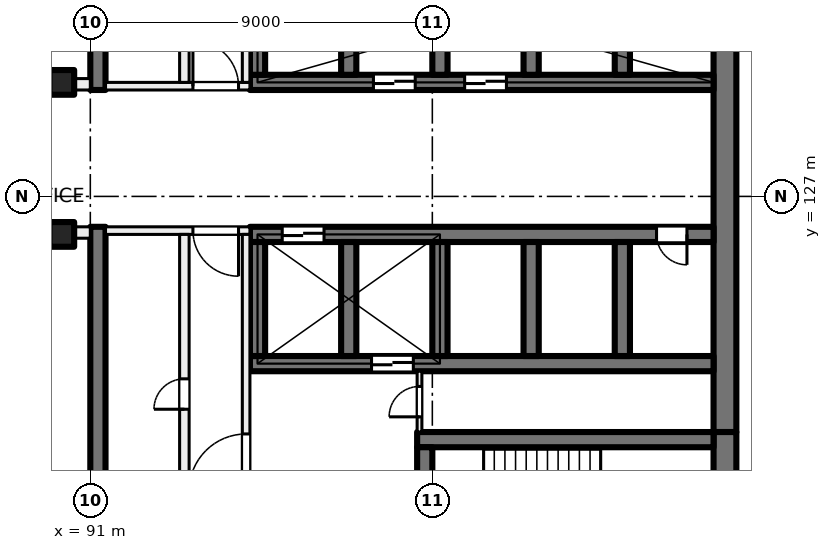
"""IFC4 building model, lengths in metres.
Left out: names, types, materials, properties, quantities, classifications, styles, units other than length and angle.
Written with IfcOpenShell. Run it as: python <this file> out.ifc"""

import sys

from ifc_helpers import new_model, si_unit, direction, frame, frame_2d, origin, origin_2d, place, context, subcontext, project, spatial, rectangle, extrude, element, fill, save


model = new_model("IFC4")
c1 = context("Model", 3, precision=1e-05, world=origin(), true_north=direction((0.0, 1.0)))
c2 = subcontext(c1, "Body", "Model", "MODEL_VIEW")
j1 = project(units=[si_unit("LENGTHUNIT", "METRE"), si_unit("PLANEANGLEUNIT", "RADIAN")], contexts=[c1])
p1 = place(None, origin())
s1 = spatial("IfcSite", under=j1, at=p1, CompositionType="ELEMENT")
p2 = place(p1, origin())
s2 = spatial("IfcBuilding", under=s1, at=p2, CompositionType="ELEMENT")
p3 = place(p2, frame((0.0, 0.0, 97.0)))
s3 = spatial("IfcBuildingStorey", under=s2, at=p3, CompositionType="ELEMENT", Elevation=97.0)
for number, where, z_axis, x_axis in (
    (1, (90.25, 130.0, 0.0), (0.0, 0.0, 1.0), (1.0, 0.0, 0.0)),
    (2, (90.25, 126.0, 0.0), (0.0, 0.0, 1.0), (1.0, 0.0, 0.0)),
):
    element("IfcColumn", number, at=place(p3, frame(where, z_axis=z_axis, x_axis=x_axis)), inside=s3, PredefinedType="COLUMN", context=c2, shape_type="SweptSolid", body=[
        extrude(rectangle(XDim=0.65, YDim=0.65, at=origin_2d()), origin(), (0.0, 0.0, 1.0), 4.0),
    ])
p4 = place(p3, frame((107.7, 135.2, 0.0), z_axis=(0.0, 0.0, 1.0), x_axis=(0.0, -1.0, 0.0)))
e3 = element("IfcWall", 3, at=p4, inside=s3, PredefinedType="SHEAR", context=c2, shape_type="SweptSolid", body=[
    extrude(rectangle(XDim=14.4, YDim=0.6, at=frame_2d((7.2, 0.0))), origin(), (0.0, 0.0, 1.0), 4.0),
])
p5 = place(p3, frame((107.7, 120.8, 0.0), z_axis=(0.0, 0.0, 1.0), x_axis=(0.0, -1.0, 0.0)))
e4 = element("IfcWall", 4, at=p5, inside=s3, PredefinedType="SHEAR", context=c2, shape_type="SweptSolid", body=[
    extrude(rectangle(XDim=3.8, YDim=0.6, at=frame_2d((1.9, 0.0))), origin(), (0.0, 0.0, 1.0), 4.0),
])
p6 = place(p3, frame((107.4, 120.6, 0.0), z_axis=(0.0, 0.0, 1.0), x_axis=(-1.0, 0.0, 0.0)))
e5 = element("IfcWall", 5, at=p6, inside=s3, PredefinedType="SHEAR", context=c2, shape_type="SweptSolid", body=[
    extrude(rectangle(XDim=7.8, YDim=0.4, at=frame_2d((3.9, 0.0))), origin(), (0.0, 0.0, 1.0), 4.0),
])
p7 = place(p3, frame((99.8, 120.4, 0.0), z_axis=(0.0, 0.0, 1.0), x_axis=(0.0, -1.0, 0.0)))
e6 = element("IfcWall", 6, at=p7, inside=s3, PredefinedType="SHEAR", context=c2, shape_type="SweptSolid", body=[
    extrude(rectangle(XDim=2.8, YDim=0.4, at=frame_2d((1.4, 0.0))), origin(), (0.0, 0.0, 1.0), 4.0),
])
p8 = place(p7, frame((0.9, 0.0, 0.0)))
e7 = element("IfcOpeningElement", 7, at=p8, cuts=e6, PredefinedType="OPENING", context=c2, shape_type="SweptSolid", body=[
    extrude(rectangle(XDim=1.0, YDim=2.1, at=frame_2d((0.5, 1.05))), frame((0.0, 0.21, 0.0), z_axis=(0.0, -1.0, 0.0), x_axis=(1.0, 0.0, 0.0)), (0.0, 0.0, 1.0), 0.42),
])
p9 = place(p3, frame((107.4, 130.0, 0.0), z_axis=(0.0, 0.0, 1.0), x_axis=(-1.0, 0.0, 0.0)))
e8 = element("IfcWall", 8, at=p9, inside=s3, PredefinedType="SHEAR", context=c2, shape_type="SweptSolid", body=[
    extrude(rectangle(XDim=12.2, YDim=0.4, at=frame_2d((6.1, 0.0))), origin(), (0.0, 0.0, 1.0), 4.0),
])
p10 = place(p9, frame((5.45, 0.0, 0.0)))
e9 = element("IfcOpeningElement", 9, at=p10, cuts=e8, PredefinedType="OPENING", context=c2, shape_type="SweptSolid", body=[
    extrude(rectangle(XDim=1.1, YDim=2.1, at=frame_2d((0.55, 1.05))), frame((0.0, 0.21, 0.0), z_axis=(0.0, -1.0, 0.0), x_axis=(1.0, 0.0, 0.0)), (0.0, 0.0, 1.0), 0.42),
])
p11 = place(p9, frame((7.85, 0.0, 0.0)))
e10 = element("IfcOpeningElement", 10, at=p11, cuts=e8, PredefinedType="OPENING", context=c2, shape_type="SweptSolid", body=[
    extrude(rectangle(XDim=1.1, YDim=2.1, at=frame_2d((0.55, 1.05))), frame((0.0, 0.21, 0.0), z_axis=(0.0, -1.0, 0.0), x_axis=(1.0, 0.0, 0.0)), (0.0, 0.0, 1.0), 0.42),
])
for number, where, z_axis, x_axis in (
    (11, (105.0, 133.2, 0.0), (0.0, 0.0, 1.0), (0.0, -1.0, 0.0)),
    (12, (102.6, 133.2, 0.0), (0.0, 0.0, 1.0), (0.0, -1.0, 0.0)),
    (13, (100.2, 133.2, 0.0), (0.0, 0.0, 1.0), (0.0, -1.0, 0.0)),
    (14, (97.8, 133.2, 0.0), (0.0, 0.0, 1.0), (0.0, -1.0, 0.0)),
    (15, (95.4, 133.2, 0.0), (0.0, 0.0, 1.0), (0.0, -1.0, 0.0)),
):
    element("IfcWall", number, at=place(p3, frame(where, z_axis=z_axis, x_axis=x_axis)), inside=s3, PredefinedType="SHEAR", context=c2, shape_type="SweptSolid", body=[
        extrude(rectangle(XDim=3.0, YDim=0.4, at=frame_2d((1.5, 0.0))), origin(), (0.0, 0.0, 1.0), 4.0),
    ])
p12 = place(p3, frame((107.4, 126.0, 0.0), z_axis=(0.0, 0.0, 1.0), x_axis=(-1.0, 0.0, 0.0)))
e16 = element("IfcWall", 16, at=p12, inside=s3, PredefinedType="SHEAR", context=c2, shape_type="SweptSolid", body=[
    extrude(rectangle(XDim=12.2, YDim=0.4, at=frame_2d((6.1, 0.0))), origin(), (0.0, 0.0, 1.0), 4.0),
])
p13 = place(p12, frame((10.25, 0.0, 0.0)))
e17 = element("IfcOpeningElement", 17, at=p13, cuts=e16, PredefinedType="OPENING", context=c2, shape_type="SweptSolid", body=[
    extrude(rectangle(XDim=1.1, YDim=2.1, at=frame_2d((0.55, 1.05))), frame((0.0, 0.21, 0.0), z_axis=(0.0, -1.0, 0.0), x_axis=(1.0, 0.0, 0.0)), (0.0, 0.0, 1.0), 0.42),
])
p14 = place(p12, frame((0.7, 0.0, 0.0)))
e18 = element("IfcOpeningElement", 18, at=p14, cuts=e16, PredefinedType="OPENING", context=c2, shape_type="SweptSolid", body=[
    extrude(rectangle(XDim=0.8, YDim=2.1, at=frame_2d((0.4, 1.05))), frame((0.0, 0.21, 0.0), z_axis=(0.0, -1.0, 0.0), x_axis=(1.0, 0.0, 0.0)), (0.0, 0.0, 1.0), 0.42),
])
p15 = place(p3, frame((107.4, 122.6, 0.0), z_axis=(0.0, 0.0, 1.0), x_axis=(-1.0, 0.0, 0.0)))
e19 = element("IfcWall", 19, at=p15, inside=s3, PredefinedType="SHEAR", context=c2, shape_type="SweptSolid", body=[
    extrude(rectangle(XDim=12.2, YDim=0.4, at=frame_2d((6.1, 0.0))), origin(), (0.0, 0.0, 1.0), 4.0),
])
p16 = place(p15, frame((7.9, 0.0, 0.0)))
e20 = element("IfcOpeningElement", 20, at=p16, cuts=e19, PredefinedType="OPENING", context=c2, shape_type="SweptSolid", body=[
    extrude(rectangle(XDim=1.1, YDim=2.1, at=frame_2d((0.55, 1.05))), frame((0.0, 0.21, 0.0), z_axis=(0.0, -1.0, 0.0), x_axis=(1.0, 0.0, 0.0)), (0.0, 0.0, 1.0), 0.42),
])
for number, where, z_axis, x_axis in (
    (21, (105.0, 125.8, 0.0), (0.0, 0.0, 1.0), (0.0, -1.0, 0.0)),
    (22, (102.6, 125.8, 0.0), (0.0, 0.0, 1.0), (0.0, -1.0, 0.0)),
    (23, (100.2, 125.8, 0.0), (0.0, 0.0, 1.0), (0.0, -1.0, 0.0)),
    (24, (97.8, 125.8, 0.0), (0.0, 0.0, 1.0), (0.0, -1.0, 0.0)),
    (25, (95.4, 125.8, 0.0), (0.0, 0.0, 1.0), (0.0, -1.0, 0.0)),
):
    element("IfcWall", number, at=place(p3, frame(where, z_axis=z_axis, x_axis=x_axis)), inside=s3, PredefinedType="SHEAR", context=c2, shape_type="SweptSolid", body=[
        extrude(rectangle(XDim=3.0, YDim=0.4, at=frame_2d((1.5, 0.0))), origin(), (0.0, 0.0, 1.0), 4.0),
    ])
for number, where, z_axis, x_axis in (
    (26, (91.2, 138.4, 0.0), (0.0, 0.0, 1.0), (0.0, -1.0, 0.0)),
    (27, (91.2, 126.2, 0.0), (0.0, 0.0, 1.0), (0.0, -1.0, 0.0)),
):
    element("IfcWall", number, at=place(p3, frame(where, z_axis=z_axis, x_axis=x_axis)), inside=s3, PredefinedType="SHEAR", context=c2, shape_type="SweptSolid", body=[
        extrude(rectangle(XDim=8.6, YDim=0.4, at=frame_2d((4.3, 0.0))), origin(), (0.0, 0.0, 1.0), 4.0),
    ])
p17 = place(p3, frame((95.2, 126.1, 0.0), z_axis=(0.0, 0.0, 1.0), x_axis=(-1.0, 0.0, 0.0)))
e28 = element("IfcWall", 28, at=p17, inside=s3, PredefinedType="PARTITIONING", context=c2, shape_type="SweptSolid", body=[
    extrude(rectangle(XDim=3.8, YDim=0.2, at=frame_2d((1.9, 0.0))), origin(), (0.0, 0.0, 1.0), 3.625),
])
p18 = place(p17, frame((0.3, 0.0, 0.0)))
e29 = element("IfcOpeningElement", 29, at=p18, cuts=e28, PredefinedType="OPENING", context=c2, shape_type="SweptSolid", body=[
    extrude(rectangle(XDim=1.2, YDim=2.1, at=frame_2d((0.6, 1.05))), frame((0.0, 0.11, 0.0), z_axis=(0.0, -1.0, 0.0), x_axis=(1.0, 0.0, 0.0)), (0.0, 0.0, 1.0), 0.22),
])
p19 = place(p3, frame((95.1, 117.6, 0.0), z_axis=(0.0, 0.0, 1.0), x_axis=(0.0, 1.0, 0.0)))
e30 = element("IfcWall", 30, at=p19, inside=s3, PredefinedType="PARTITIONING", context=c2, shape_type="SweptSolid", body=[
    extrude(rectangle(XDim=8.4, YDim=0.2, at=frame_2d((4.2, 0.0))), origin(), (0.0, 0.0, 1.0), 3.625),
])
p20 = place(p19, frame((1.65, 0.0, 0.0)))
e31 = element("IfcOpeningElement", 31, at=p20, cuts=e30, PredefinedType="OPENING", context=c2, shape_type="SweptSolid", body=[
    extrude(rectangle(XDim=1.5, YDim=2.1, at=frame_2d((0.75, 1.05))), frame((0.0, 0.11, 0.0), z_axis=(0.0, -1.0, 0.0), x_axis=(1.0, 0.0, 0.0)), (0.0, 0.0, 1.0), 0.22),
])
p21 = place(p3, frame((93.475, 117.6, 0.0), z_axis=(0.0, 0.0, 1.0), x_axis=(0.0, 1.0, 0.0)))
e32 = element("IfcWall", 32, at=p21, inside=s3, PredefinedType="PARTITIONING", context=c2, shape_type="SweptSolid", body=[
    extrude(rectangle(XDim=8.4, YDim=0.25, at=frame_2d((4.2, 0.0))), origin(), (0.0, 0.0, 1.0), 3.625),
])
p22 = place(p21, frame((3.8, 0.0, 0.0)))
e33 = element("IfcOpeningElement", 33, at=p22, cuts=e32, PredefinedType="OPENING", context=c2, shape_type="SweptSolid", body=[
    extrude(rectangle(XDim=0.8, YDim=2.1, at=frame_2d((0.4, 1.05))), frame((0.0, 0.135, 0.0), z_axis=(0.0, -1.0, 0.0), x_axis=(1.0, 0.0, 0.0)), (0.0, 0.0, 1.0), 0.27),
])
p23 = place(p3, frame((99.663, 120.8, 0.0), z_axis=(0.0, 0.0, 1.0), x_axis=(0.0, 1.0, 0.0)))
e34 = element("IfcWall", 34, at=p23, inside=s3, PredefinedType="PARTITIONING", context=c2, shape_type="SweptSolid", body=[
    extrude(rectangle(XDim=1.6, YDim=0.125, at=frame_2d((0.8, 0.0))), origin(), (0.0, 0.0, 1.0), 3.625),
])
p24 = place(p23, frame((0.4, 0.0, 0.0)))
e35 = element("IfcOpeningElement", 35, at=p24, cuts=e34, PredefinedType="OPENING", context=c2, shape_type="SweptSolid", body=[
    extrude(rectangle(XDim=0.8, YDim=2.1, at=frame_2d((0.4, 1.05))), frame((0.0, 0.073, 0.0), z_axis=(0.0, -1.0, 0.0), x_axis=(1.0, 0.0, 0.0)), (0.0, 0.0, 1.0), 0.145),
])
p25 = place(p3, frame((91.4, 129.9, 0.0), z_axis=(0.0, 0.0, 1.0), x_axis=(1.0, 0.0, 0.0)))
e36 = element("IfcWall", 36, at=p25, inside=s3, PredefinedType="PARTITIONING", context=c2, shape_type="SweptSolid", body=[
    extrude(rectangle(XDim=3.8, YDim=0.2, at=frame_2d((1.9, 0.0))), origin(), (0.0, 0.0, 1.0), 3.625),
])
p26 = place(p25, frame((2.3, 0.0, 0.0)))
e37 = element("IfcOpeningElement", 37, at=p26, cuts=e36, PredefinedType="OPENING", context=c2, shape_type="SweptSolid", body=[
    extrude(rectangle(XDim=1.2, YDim=2.1, at=frame_2d((0.6, 1.05))), frame((0.0, 0.11, 0.0), z_axis=(0.0, -1.0, 0.0), x_axis=(1.0, 0.0, 0.0)), (0.0, 0.0, 1.0), 0.22),
])
p27 = place(p3, frame((95.1, 130.0, 0.0), z_axis=(0.0, 0.0, 1.0), x_axis=(0.0, 1.0, 0.0)))
e38 = element("IfcWall", 38, at=p27, inside=s3, PredefinedType="PARTITIONING", context=c2, shape_type="SweptSolid", body=[
    extrude(rectangle(XDim=8.4, YDim=0.2, at=frame_2d((4.2, 0.0))), origin(), (0.0, 0.0, 1.0), 3.625),
])
p28 = place(p27, frame((5.25, 0.0, 0.0)))
e39 = element("IfcOpeningElement", 39, at=p28, cuts=e38, PredefinedType="OPENING", context=c2, shape_type="SweptSolid", body=[
    extrude(rectangle(XDim=1.5, YDim=2.1, at=frame_2d((0.75, 1.05))), frame((0.0, 0.11, 0.0), z_axis=(0.0, -1.0, 0.0), x_axis=(1.0, 0.0, 0.0)), (0.0, 0.0, 1.0), 0.22),
])
p29 = place(p3, frame((93.475, 130.0, 0.0), z_axis=(0.0, 0.0, 1.0), x_axis=(0.0, 1.0, 0.0)))
e40 = element("IfcWall", 40, at=p29, inside=s3, PredefinedType="PARTITIONING", context=c2, shape_type="SweptSolid", body=[
    extrude(rectangle(XDim=8.4, YDim=0.25, at=frame_2d((4.2, 0.0))), origin(), (0.0, 0.0, 1.0), 3.625),
])
p30 = place(p29, frame((2.375, 0.0, 0.0)))
e41 = element("IfcOpeningElement", 41, at=p30, cuts=e40, PredefinedType="OPENING", context=c2, shape_type="SweptSolid", body=[
    extrude(rectangle(XDim=0.8, YDim=2.1, at=frame_2d((0.4, 1.05))), frame((0.0, 0.135, 0.0), z_axis=(0.0, -1.0, 0.0), x_axis=(1.0, 0.0, 0.0)), (0.0, 0.0, 1.0), 0.27),
])
p31 = place(p29, frame((6.625, 0.0, 0.0)))
e42 = element("IfcOpeningElement", 42, at=p31, cuts=e40, PredefinedType="OPENING", context=c2, shape_type="SweptSolid", body=[
    extrude(rectangle(XDim=0.8, YDim=2.1, at=frame_2d((0.4, 1.05))), frame((0.0, 0.135, 0.0), z_axis=(0.0, -1.0, 0.0), x_axis=(1.0, 0.0, 0.0)), (0.0, 0.0, 1.0), 0.27),
])
p32 = place(p3, frame((72.5, 129.95, 0.0), z_axis=(0.0, 0.0, 1.0), x_axis=(1.0, 0.0, 0.0)))
e43 = element("IfcWall", 43, at=p32, inside=s3, PredefinedType="PARTITIONING", context=c2, shape_type="SweptSolid", body=[
    extrude(rectangle(XDim=18.5, YDim=0.3, at=frame_2d((9.25, 0.0))), origin(), (0.0, 0.0, 1.0), 3.625),
])
p33 = place(p32, frame((15.375, 0.0, 0.0)))
e44 = element("IfcOpeningElement", 44, at=p33, cuts=e43, PredefinedType="OPENING", context=c2, shape_type="SweptSolid", body=[
    extrude(rectangle(XDim=1.0, YDim=2.1, at=frame_2d((0.5, 1.05))), frame((0.0, 0.16, 0.0), z_axis=(0.0, -1.0, 0.0), x_axis=(1.0, 0.0, 0.0)), (0.0, 0.0, 1.0), 0.32),
])
p34 = place(p32, frame((10.5, 0.0, 0.0)))
e45 = element("IfcOpeningElement", 45, at=p34, cuts=e43, PredefinedType="OPENING", context=c2, shape_type="SweptSolid", body=[
    extrude(rectangle(XDim=1.0, YDim=2.1, at=frame_2d((0.5, 1.05))), frame((0.0, 0.16, 0.0), z_axis=(0.0, -1.0, 0.0), x_axis=(1.0, 0.0, 0.0)), (0.0, 0.0, 1.0), 0.32),
])
p35 = place(p32, frame((3.475, 0.0, 0.0)))
e46 = element("IfcOpeningElement", 46, at=p35, cuts=e43, PredefinedType="OPENING", context=c2, shape_type="SweptSolid", body=[
    extrude(rectangle(XDim=1.8, YDim=2.1, at=frame_2d((0.9, 1.05))), frame((0.0, 0.16, 0.0), z_axis=(0.0, -1.0, 0.0), x_axis=(1.0, 0.0, 0.0)), (0.0, 0.0, 1.0), 0.32),
])
p36 = place(p3, frame((91.0, 126.05, 0.0), z_axis=(0.0, 0.0, 1.0), x_axis=(-1.0, 0.0, 0.0)))
e47 = element("IfcWall", 47, at=p36, inside=s3, PredefinedType="PARTITIONING", context=c2, shape_type="SweptSolid", body=[
    extrude(rectangle(XDim=43.785, YDim=0.3, at=frame_2d((21.893, 0.0))), origin(), (0.0, 0.0, 1.0), 3.625),
])
p37 = place(p36, frame((7.0, 0.0, 0.0)))
e48 = element("IfcOpeningElement", 48, at=p37, cuts=e47, PredefinedType="OPENING", context=c2, shape_type="SweptSolid", body=[
    extrude(rectangle(XDim=1.0, YDim=2.1, at=frame_2d((0.5, 1.05))), frame((0.0, 0.16, 0.0), z_axis=(0.0, -1.0, 0.0), x_axis=(1.0, 0.0, 0.0)), (0.0, 0.0, 1.0), 0.32),
])
p38 = place(p36, frame((15.6, 0.0, 0.0)))
e49 = element("IfcOpeningElement", 49, at=p38, cuts=e47, PredefinedType="OPENING", context=c2, shape_type="SweptSolid", body=[
    extrude(rectangle(XDim=1.8, YDim=2.1, at=frame_2d((0.9, 1.05))), frame((0.0, 0.16, 0.0), z_axis=(0.0, -1.0, 0.0), x_axis=(1.0, 0.0, 0.0)), (0.0, 0.0, 1.0), 0.32),
])
p39 = place(p36, frame((34.0, 0.0, 0.0)))
e50 = element("IfcOpeningElement", 50, at=p39, cuts=e47, PredefinedType="OPENING", context=c2, shape_type="SweptSolid", body=[
    extrude(rectangle(XDim=1.0, YDim=2.1, at=frame_2d((0.5, 1.05))), frame((0.0, 0.16, 0.0), z_axis=(0.0, -1.0, 0.0), x_axis=(1.0, 0.0, 0.0)), (0.0, 0.0, 1.0), 0.32),
])
p40 = place(p36, frame((39.296, 0.0, 0.0)))
e51 = element("IfcOpeningElement", 51, at=p40, cuts=e47, PredefinedType="OPENING", context=c2, shape_type="SweptSolid", body=[
    extrude(rectangle(XDim=1.8, YDim=2.1, at=frame_2d((0.9, 1.05))), frame((0.0, 0.16, 0.0), z_axis=(0.0, -1.0, 0.0), x_axis=(1.0, 0.0, 0.0)), (0.0, 0.0, 1.0), 0.32),
])
p41 = place(p13, origin())
e52 = element("IfcDoor", 52, at=p41, inside=s3, OperationType="DOUBLE_DOOR_SLIDING", PredefinedType="DOOR", context=c2, shape_type="SweptSolid", body=[
    extrude(rectangle(XDim=1.1, YDim=2.1, at=frame_2d((0.55, 1.05))), frame((0.0, 0.025, 0.0), z_axis=(0.0, -1.0, 0.0), x_axis=(1.0, 0.0, 0.0)), (0.0, 0.0, 1.0), 0.05),
])
fill(e17, e52)
p42 = place(p10, origin())
e53 = element("IfcDoor", 53, at=p42, inside=s3, OperationType="DOUBLE_DOOR_SLIDING", PredefinedType="DOOR", context=c2, shape_type="SweptSolid", body=[
    extrude(rectangle(XDim=1.1, YDim=2.1, at=frame_2d((0.55, 1.05))), frame((0.0, 0.025, 0.0), z_axis=(0.0, -1.0, 0.0), x_axis=(1.0, 0.0, 0.0)), (0.0, 0.0, 1.0), 0.05),
])
fill(e9, e53)
p43 = place(p11, origin())
e54 = element("IfcDoor", 54, at=p43, inside=s3, OperationType="DOUBLE_DOOR_SLIDING", PredefinedType="DOOR", context=c2, shape_type="SweptSolid", body=[
    extrude(rectangle(XDim=1.1, YDim=2.1, at=frame_2d((0.55, 1.05))), frame((0.0, 0.025, 0.0), z_axis=(0.0, -1.0, 0.0), x_axis=(1.0, 0.0, 0.0)), (0.0, 0.0, 1.0), 0.05),
])
fill(e10, e54)
p44 = place(p14, origin())
e55 = element("IfcDoor", 55, at=p44, inside=s3, OperationType="SINGLE_SWING_LEFT", PredefinedType="DOOR", context=c2, shape_type="SweptSolid", body=[
    extrude(rectangle(XDim=0.8, YDim=2.1, at=frame_2d((0.4, 1.05))), frame((0.0, 0.025, 0.0), z_axis=(0.0, -1.0, 0.0), x_axis=(1.0, 0.0, 0.0)), (0.0, 0.0, 1.0), 0.05),
])
fill(e18, e55)
p45 = place(p18, origin())
e56 = element("IfcDoor", 56, at=p45, inside=s3, OperationType="DOUBLE_DOOR_SINGLE_SWING", PredefinedType="DOOR", context=c2, shape_type="SweptSolid", body=[
    extrude(rectangle(XDim=1.2, YDim=2.1, at=frame_2d((0.6, 1.05))), frame((0.0, 0.025, 0.0), z_axis=(0.0, -1.0, 0.0), x_axis=(1.0, 0.0, 0.0)), (0.0, 0.0, 1.0), 0.05),
])
fill(e29, e56)
p46 = place(p20, origin())
e57 = element("IfcDoor", 57, at=p46, inside=s3, OperationType="DOUBLE_DOOR_SINGLE_SWING", PredefinedType="DOOR", context=c2, shape_type="SweptSolid", body=[
    extrude(rectangle(XDim=1.5, YDim=2.1, at=frame_2d((0.75, 1.05))), frame((0.0, 0.025, 0.0), z_axis=(0.0, -1.0, 0.0), x_axis=(1.0, 0.0, 0.0)), (0.0, 0.0, 1.0), 0.05),
])
fill(e31, e57)
p47 = place(p24, origin())
e58 = element("IfcDoor", 58, at=p47, inside=s3, OperationType="SINGLE_SWING_RIGHT", PredefinedType="DOOR", context=c2, shape_type="SweptSolid", body=[
    extrude(rectangle(XDim=0.8, YDim=2.1, at=frame_2d((0.4, 1.05))), frame((0.0, 0.025, 0.0), z_axis=(0.0, -1.0, 0.0), x_axis=(1.0, 0.0, 0.0)), (0.0, 0.0, 1.0), 0.05),
])
fill(e35, e58)
p48 = place(p22, origin())
e59 = element("IfcDoor", 59, at=p48, inside=s3, OperationType="SINGLE_SWING_LEFT", PredefinedType="DOOR", context=c2, shape_type="SweptSolid", body=[
    extrude(rectangle(XDim=0.8, YDim=2.1, at=frame_2d((0.4, 1.05))), frame((0.0, 0.025, 0.0), z_axis=(0.0, -1.0, 0.0), x_axis=(1.0, 0.0, 0.0)), (0.0, 0.0, 1.0), 0.05),
])
fill(e33, e59)
p49 = place(p26, origin())
e60 = element("IfcDoor", 60, at=p49, inside=s3, OperationType="DOUBLE_DOOR_SINGLE_SWING", PredefinedType="DOOR", context=c2, shape_type="SweptSolid", body=[
    extrude(rectangle(XDim=1.2, YDim=2.1, at=frame_2d((0.6, 1.05))), frame((0.0, 0.025, 0.0), z_axis=(0.0, -1.0, 0.0), x_axis=(1.0, 0.0, 0.0)), (0.0, 0.0, 1.0), 0.05),
])
fill(e37, e60)
p50 = place(p16, origin())
e61 = element("IfcDoor", 61, at=p50, inside=s3, OperationType="DOUBLE_DOOR_SLIDING", PredefinedType="DOOR", context=c2, shape_type="SweptSolid", body=[
    extrude(rectangle(XDim=1.1, YDim=2.1, at=frame_2d((0.55, 1.05))), frame((0.0, 0.025, 0.0), z_axis=(0.0, -1.0, 0.0), x_axis=(1.0, 0.0, 0.0)), (0.0, 0.0, 1.0), 0.05),
])
fill(e20, e61)
save(model, sys.argv[1])
